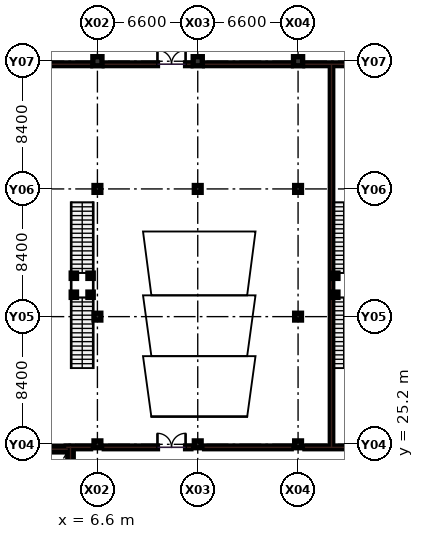
"""IFC4 building model, lengths in metres.
Left out: names, types, materials, properties, quantities, classifications, styles, units other than length and angle.
Written with IfcOpenShell. Run it as: python <this file> out.ifc"""

import sys

from ifc_helpers import new_model, si_unit, direction, frame, frame_2d, origin, origin_2d, place, context, subcontext, project, spatial, rectangle, extrude, element, fill, save


model = new_model("IFC4")
c1 = context("Model", 3, precision=1e-05, world=origin(), true_north=direction((0.0, 1.0)))
c2 = subcontext(c1, "Body", "Model", "MODEL_VIEW")
j1 = project(units=[si_unit("LENGTHUNIT", "METRE"), si_unit("PLANEANGLEUNIT", "RADIAN")], contexts=[c1])
p1 = place(None, origin())
s1 = spatial("IfcSite", under=j1, at=p1, CompositionType="ELEMENT")
p2 = place(p1, origin())
s2 = spatial("IfcBuilding", under=s1, at=p2, CompositionType="ELEMENT")
p3 = place(p2, origin())
s3 = spatial("IfcBuildingStorey", under=s2, at=p3, CompositionType="ELEMENT", Elevation=0.0)
for number, where, z_axis, x_axis in (
    (1, (6.6, 25.2, 0.0), (0.0, 0.0, 1.0), (1.0, 0.0, 0.0)),
    (2, (6.6, 33.6, 0.0), (0.0, 0.0, 1.0), (1.0, 0.0, 0.0)),
    (3, (6.6, 42.0, 0.0), (0.0, 0.0, 1.0), (1.0, 0.0, 0.0)),
):
    element("IfcColumn", number, at=place(p3, frame(where, z_axis=z_axis, x_axis=x_axis)), inside=s3, PredefinedType="COLUMN", context=c2, shape_type="SweptSolid", body=[
        extrude(rectangle(XDim=0.45, YDim=0.45, at=origin_2d()), origin(), (0.0, 0.0, 1.0), 5.4),
    ])
p4 = place(p3, frame((6.6, 50.4, 0.0), z_axis=(0.0, 0.0, 1.0), x_axis=(1.0, 0.0, 0.0)))
e4 = element("IfcColumn", 4, at=p4, inside=s3, PredefinedType="COLUMN", context=c2, shape_type="SweptSolid", body=[
    extrude(rectangle(XDim=0.6, YDim=0.6, at=origin_2d()), origin(), (0.0, 0.0, 1.0), 5.4),
])
for number, where, z_axis, x_axis in (
    (5, (13.2, 25.2, 0.0), (0.0, 0.0, 1.0), (1.0, 0.0, 0.0)),
    (6, (13.2, 42.0, 0.0), (0.0, 0.0, 1.0), (1.0, 0.0, 0.0)),
):
    element("IfcColumn", number, at=place(p3, frame(where, z_axis=z_axis, x_axis=x_axis)), inside=s3, PredefinedType="COLUMN", context=c2, shape_type="SweptSolid", body=[
        extrude(rectangle(XDim=0.45, YDim=0.45, at=origin_2d()), origin(), (0.0, 0.0, 1.0), 5.4),
    ])
p5 = place(p3, frame((13.2, 50.4, 0.0), z_axis=(0.0, 0.0, 1.0), x_axis=(1.0, 0.0, 0.0)))
e7 = element("IfcColumn", 7, at=p5, inside=s3, PredefinedType="COLUMN", context=c2, shape_type="SweptSolid", body=[
    extrude(rectangle(XDim=0.6, YDim=0.6, at=origin_2d()), origin(), (0.0, 0.0, 1.0), 5.4),
])
for number, where, z_axis, x_axis in (
    (8, (19.8, 25.2, 0.0), (0.0, 0.0, 1.0), (1.0, 0.0, 0.0)),
    (9, (19.8, 33.6, 0.0), (0.0, 0.0, 1.0), (1.0, 0.0, 0.0)),
    (10, (19.8, 42.0, 0.0), (0.0, 0.0, 1.0), (1.0, 0.0, 0.0)),
):
    element("IfcColumn", number, at=place(p3, frame(where, z_axis=z_axis, x_axis=x_axis)), inside=s3, PredefinedType="COLUMN", context=c2, shape_type="SweptSolid", body=[
        extrude(rectangle(XDim=0.45, YDim=0.45, at=origin_2d()), origin(), (0.0, 0.0, 1.0), 5.4),
    ])
p6 = place(p3, frame((19.8, 50.4, 0.0), z_axis=(0.0, 0.0, 1.0), x_axis=(1.0, 0.0, 0.0)))
e11 = element("IfcColumn", 11, at=p6, inside=s3, PredefinedType="COLUMN", context=c2, shape_type="SweptSolid", body=[
    extrude(rectangle(XDim=0.6, YDim=0.6, at=origin_2d()), origin(), (0.0, 0.0, 1.0), 5.4),
])
p7 = place(p3, frame((4.55, 25.0, 0.0), z_axis=(0.0, 0.0, 1.0), x_axis=(1.0, 0.0, 0.0)))
e12 = element("IfcWall", 12, at=p7, inside=s3, PredefinedType="SOLIDWALL", context=c2, shape_type="SweptSolid", body=[
    extrude(rectangle(XDim=1.6, YDim=0.18, at=frame_2d((0.8, 0.0))), origin(), (0.0, 0.0, 1.0), 4.235),
])
p8 = place(p3, frame((7.05, 25.0, 0.0), z_axis=(0.0, 0.0, 1.0), x_axis=(1.0, 0.0, 0.0)))
e13 = element("IfcWall", 13, at=p8, inside=s3, PredefinedType="SOLIDWALL", context=c2, shape_type="SweptSolid", body=[
    extrude(rectangle(XDim=5.7, YDim=0.18, at=frame_2d((2.85, 0.0))), origin(), (0.0, 0.0, 1.0), 4.235),
])
p9 = place(p8, frame((3.5, 0.0, 0.0)))
e14 = element("IfcOpeningElement", 14, at=p9, cuts=e13, PredefinedType="OPENING", context=c2, shape_type="SweptSolid", body=[
    extrude(rectangle(XDim=1.85, YDim=2.25, at=frame_2d((0.925, 1.125))), frame((0.0, 0.1, 0.0), z_axis=(0.0, -1.0, 0.0), x_axis=(1.0, 0.0, 0.0)), (0.0, 0.0, 1.0), 0.2),
])
p10 = place(p3, frame((13.65, 25.0, 0.0), z_axis=(0.0, 0.0, 1.0), x_axis=(1.0, 0.0, 0.0)))
e15 = element("IfcWall", 15, at=p10, inside=s3, PredefinedType="SOLIDWALL", context=c2, shape_type="SweptSolid", body=[
    extrude(rectangle(XDim=5.7, YDim=0.18, at=frame_2d((2.85, 0.0))), origin(), (0.0, 0.0, 1.0), 4.235),
])
p11 = place(p3, frame((20.25, 25.0, 0.0), z_axis=(0.0, 0.0, 1.0), x_axis=(1.0, 0.0, 0.0)))
e16 = element("IfcWall", 16, at=p11, inside=s3, PredefinedType="SOLIDWALL", context=c2, shape_type="SweptSolid", body=[
    extrude(rectangle(XDim=5.7, YDim=0.18, at=frame_2d((2.85, 0.0))), origin(), (0.0, 0.0, 1.0), 4.235),
])
p12 = place(p11, frame((3.5, 0.0, 0.0)))
e17 = element("IfcOpeningElement", 17, at=p12, cuts=e16, PredefinedType="OPENING", context=c2, shape_type="SweptSolid", body=[
    extrude(rectangle(XDim=1.85, YDim=2.25, at=frame_2d((0.925, 1.125))), frame((0.0, 0.1, 0.0), z_axis=(0.0, -1.0, 0.0), x_axis=(1.0, 0.0, 0.0)), (0.0, 0.0, 1.0), 0.2),
])
p13 = place(p3, frame((22.0, 25.0, 0.0), z_axis=(0.0, 0.0, 1.0), x_axis=(0.0, 1.0, 0.0)))
e18 = element("IfcWall", 18, at=p13, inside=s3, PredefinedType="PARTITIONING", context=c2, shape_type="SweptSolid", body=[
    extrude(rectangle(XDim=25.2, YDim=0.16, at=frame_2d((12.6, 0.0))), origin(), (0.0, 0.0, 1.0), 4.25),
])
p14 = place(p3, frame((0.32, 50.2, 0.0), z_axis=(0.0, 0.0, 1.0), x_axis=(1.0, 0.0, 0.0)))
e19 = element("IfcWall", 19, at=p14, inside=s3, PredefinedType="SOLIDWALL", context=c2, shape_type="SweptSolid", body=[
    extrude(rectangle(XDim=5.83, YDim=0.18, at=frame_2d((2.915, 0.0))), origin(), (0.0, 0.0, 1.0), 4.235),
])
p15 = place(p3, frame((7.05, 50.2, 0.0), z_axis=(0.0, 0.0, 1.0), x_axis=(1.0, 0.0, 0.0)))
e20 = element("IfcWall", 20, at=p15, inside=s3, PredefinedType="SOLIDWALL", context=c2, shape_type="SweptSolid", body=[
    extrude(rectangle(XDim=5.7, YDim=0.18, at=frame_2d((2.85, 0.0))), origin(), (0.0, 0.0, 1.0), 4.235),
])
p16 = place(p15, frame((3.5, 0.0, 0.0)))
e21 = element("IfcOpeningElement", 21, at=p16, cuts=e20, PredefinedType="OPENING", context=c2, shape_type="SweptSolid", body=[
    extrude(rectangle(XDim=1.85, YDim=2.25, at=frame_2d((0.925, 1.125))), frame((0.0, 0.1, 0.0), z_axis=(0.0, -1.0, 0.0), x_axis=(1.0, 0.0, 0.0)), (0.0, 0.0, 1.0), 0.2),
])
p17 = place(p3, frame((13.65, 50.2, 0.0), z_axis=(0.0, 0.0, 1.0), x_axis=(1.0, 0.0, 0.0)))
e22 = element("IfcWall", 22, at=p17, inside=s3, PredefinedType="SOLIDWALL", context=c2, shape_type="SweptSolid", body=[
    extrude(rectangle(XDim=5.7, YDim=0.18, at=frame_2d((2.85, 0.0))), origin(), (0.0, 0.0, 1.0), 4.235),
])
p18 = place(p3, frame((20.25, 50.2, 0.0), z_axis=(0.0, 0.0, 1.0), x_axis=(1.0, 0.0, 0.0)))
e23 = element("IfcWall", 23, at=p18, inside=s3, PredefinedType="SOLIDWALL", context=c2, shape_type="SweptSolid", body=[
    extrude(rectangle(XDim=5.7, YDim=0.18, at=frame_2d((2.85, 0.0))), origin(), (0.0, 0.0, 1.0), 4.235),
])
p19 = place(p3, frame((4.83, 16.97, 0.0), z_axis=(0.0, 0.0, 1.0), x_axis=(0.0, 1.0, 0.0)))
e24 = element("IfcWall", 24, at=p19, inside=s3, PredefinedType="SHEAR", context=c2, shape_type="SweptSolid", body=[
    extrude(rectangle(XDim=8.09, YDim=0.36, at=frame_2d((4.045, 0.0))), origin(), (0.0, 0.0, 1.0), 5.1),
])
p20 = place(p19, frame((0.45, 0.0, 0.0)))
e25 = element("IfcOpeningElement", 25, at=p20, cuts=e24, PredefinedType="OPENING", context=c2, shape_type="SweptSolid", body=[
    extrude(rectangle(XDim=1.25, YDim=2.15, at=frame_2d((0.625, 1.075))), frame((0.0, 0.19, 0.0), z_axis=(0.0, -1.0, 0.0), x_axis=(1.0, 0.0, 0.0)), (0.0, 0.0, 1.0), 0.38),
])
p21 = place(p3, frame((0.85, 24.88, 0.0), z_axis=(0.0, 0.0, 1.0), x_axis=(1.0, 0.0, 0.0)))
e26 = element("IfcWall", 26, at=p21, inside=s3, PredefinedType="SHEAR", context=c2, shape_type="SweptSolid", body=[
    extrude(rectangle(XDim=3.8, YDim=0.36, at=frame_2d((1.9, 0.0))), origin(), (0.0, 0.0, 1.0), 5.1),
])
for number, where, z_axis, x_axis in (
    (27, (22.25, 35.04, 0.0), (0.0, 0.0, 1.0), (1.0, 0.0, 0.0)),
    (28, (22.25, 36.29, 0.0), (0.0, 0.0, 1.0), (1.0, 0.0, 0.0)),
    (29, (5.05, 35.04, 0.0), (0.0, 0.0, 1.0), (1.0, 0.0, 0.0)),
    (30, (6.15, 35.04, 0.0), (0.0, 0.0, 1.0), (1.0, 0.0, 0.0)),
    (31, (6.15, 36.29, 0.0), (0.0, 0.0, 1.0), (1.0, 0.0, 0.0)),
    (32, (5.05, 36.29, 0.0), (0.0, 0.0, 1.0), (1.0, 0.0, 0.0)),
):
    element("IfcColumn", number, at=place(p3, frame(where, z_axis=z_axis, x_axis=x_axis)), inside=s3, PredefinedType="COLUMN", context=c2, shape_type="SweptSolid", body=[
        extrude(rectangle(XDim=0.35, YDim=0.35, at=origin_2d()), origin(), (0.0, 0.0, 1.0), 2.49),
    ])
p22 = place(p9, origin())
e33 = element("IfcDoor", 33, at=p22, inside=s3, OperationType="DOUBLE_DOOR_SINGLE_SWING", PredefinedType="DOOR", context=c2, shape_type="SweptSolid", body=[
    extrude(rectangle(XDim=1.85, YDim=2.25, at=frame_2d((0.925, 1.125))), frame((0.0, 0.025, 0.0), z_axis=(0.0, -1.0, 0.0), x_axis=(1.0, 0.0, 0.0)), (0.0, 0.0, 1.0), 0.05),
])
fill(e14, e33)
p23 = place(p16, origin())
e34 = element("IfcDoor", 34, at=p23, inside=s3, OperationType="DOUBLE_DOOR_SINGLE_SWING", PredefinedType="DOOR", context=c2, shape_type="SweptSolid", body=[
    extrude(rectangle(XDim=1.85, YDim=2.25, at=frame_2d((0.925, 1.125))), frame((0.0, 0.025, 0.0), z_axis=(0.0, -1.0, 0.0), x_axis=(1.0, 0.0, 0.0)), (0.0, 0.0, 1.0), 0.05),
])
fill(e21, e34)
save(model, sys.argv[1])
